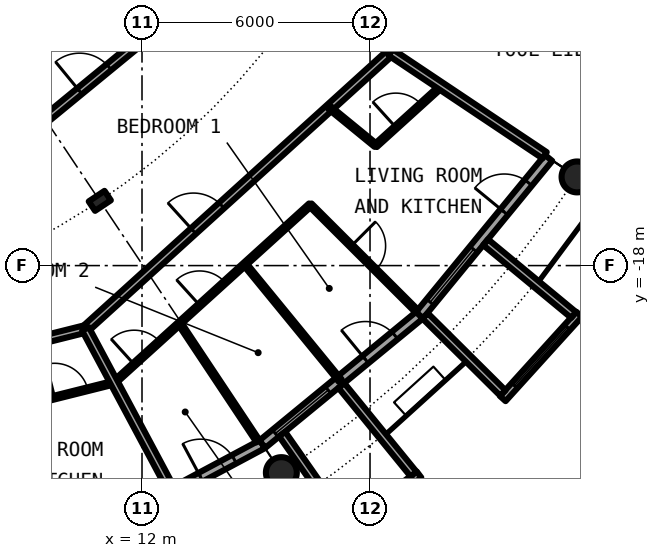
"""IFC4 building model, lengths in metres.
Left out: names, types, materials, properties, quantities, classifications, styles, units other than length and angle.
Written with IfcOpenShell. Run it as: python <this file> out.ifc"""

import sys

from ifc_helpers import new_model, si_unit, direction, frame, frame_2d, origin, origin_2d, place, context, subcontext, project, spatial, rectangle, circle, hollow_circle, i_section, extrude, element, fill, save


model = new_model("IFC4")
c1 = context("Model", 3, precision=1e-05, world=origin(), true_north=direction((0.0, 1.0)))
c2 = subcontext(c1, "Body", "Model", "MODEL_VIEW")
j1 = project(units=[si_unit("LENGTHUNIT", "METRE"), si_unit("PLANEANGLEUNIT", "RADIAN")], contexts=[c1])
p1 = place(None, origin())
s1 = spatial("IfcSite", under=j1, at=p1, CompositionType="ELEMENT")
p2 = place(p1, origin())
s2 = spatial("IfcBuilding", under=s1, at=p2, CompositionType="ELEMENT")
p3 = place(p2, frame((0.0, 0.0, 161.6)))
s3 = spatial("IfcBuildingStorey", under=s2, at=p3, CompositionType="ELEMENT", Elevation=161.6)
for number, where, z_axis, x_axis in (
    (1, (15.667, -23.448, 0.0), (0.0, 0.0, 1.0), (1.0, 0.0, 0.0)),
    (2, (23.448, -15.667, 0.0), (0.0, 0.0, 1.0), (1.0, 0.0, 0.0)),
):
    element("IfcColumn", number, at=place(p3, frame(where, z_axis=z_axis, x_axis=x_axis)), inside=s3, PredefinedType="COLUMN", context=c2, shape_type="SweptSolid", body=[
        extrude(hollow_circle(Radius=0.406, WallThickness=0.04, at=origin_2d()), origin(), (0.0, 0.0, 1.0), 3.05),
    ])
p4 = place(p3, frame((10.889, -16.297, 0.0), z_axis=(0.0, 0.0, 1.0), x_axis=(0.55557023302, -0.831469612303, 0.0)))
e3 = element("IfcColumn", 3, at=p4, inside=s3, PredefinedType="COLUMN", context=c2, shape_type="SweptSolid", body=[
    extrude(i_section(OverallWidth=0.3, OverallDepth=0.5, WebThickness=0.014, FlangeThickness=0.028, FilletRadius=0.027, at=origin_2d()), origin(), (0.0, 0.0, 1.0), 3.05),
])
p5 = place(p3, frame((10.447, -25.222, 0.0), z_axis=(0.0, 0.0, 1.0), x_axis=(0.881915646801, 0.471407246368, 0.0)))
e4 = element("IfcWall", 4, at=p5, inside=s3, PredefinedType="SOLIDWALL", context=c2, shape_type="SweptSolid", body=[
    extrude(rectangle(XDim=5.352, YDim=0.25, at=frame_2d((2.676, 0.0))), origin(), (0.0, 0.0, 1.0), 2.7),
])
p6 = place(p5, frame((0.441, 0.0, 0.3)))
e5 = element("IfcOpeningElement", 5, at=p6, cuts=e4, PredefinedType="OPENING", context=c2, shape_type="SweptSolid", body=[
    extrude(rectangle(XDim=1.8, YDim=2.1, at=frame_2d((0.9, 1.05))), frame((0.0, 0.135, 0.0), z_axis=(0.0, -1.0, 0.0), x_axis=(1.0, 0.0, 0.0)), (0.0, 0.0, 1.0), 0.27),
])
p7 = place(p5, frame((3.51, 0.0, 0.0)))
e6 = element("IfcOpeningElement", 6, at=p7, cuts=e4, PredefinedType="OPENING", context=c2, shape_type="SweptSolid", body=[
    extrude(rectangle(XDim=1.0, YDim=2.2, at=frame_2d((0.5, 1.1))), frame((0.0, 0.135, 0.0), z_axis=(0.0, -1.0, 0.0), x_axis=(1.0, 0.0, 0.0)), (0.0, 0.0, 1.0), 0.27),
])
p8 = place(p3, frame((15.167, -22.699, 0.0), z_axis=(0.0, 0.0, 1.0), x_axis=(0.773019449054, 0.634382322723, 0.0)))
e7 = element("IfcWall", 7, at=p8, inside=s3, PredefinedType="SOLIDWALL", context=c2, shape_type="SweptSolid", body=[
    extrude(rectangle(XDim=5.352, YDim=0.25, at=frame_2d((2.676, 0.0))), origin(), (0.0, 0.0, 1.0), 2.7),
])
p9 = place(p8, frame((0.441, 0.0, 0.3)))
e8 = element("IfcOpeningElement", 8, at=p9, cuts=e7, PredefinedType="OPENING", context=c2, shape_type="SweptSolid", body=[
    extrude(rectangle(XDim=1.8, YDim=2.1, at=frame_2d((0.9, 1.05))), frame((0.0, 0.135, 0.0), z_axis=(0.0, -1.0, 0.0), x_axis=(1.0, 0.0, 0.0)), (0.0, 0.0, 1.0), 0.27),
])
p10 = place(p8, frame((3.51, 0.0, 0.0)))
e9 = element("IfcOpeningElement", 9, at=p10, cuts=e7, PredefinedType="OPENING", context=c2, shape_type="SweptSolid", body=[
    extrude(rectangle(XDim=1.0, YDim=2.2, at=frame_2d((0.5, 1.1))), frame((0.0, 0.135, 0.0), z_axis=(0.0, -1.0, 0.0), x_axis=(1.0, 0.0, 0.0)), (0.0, 0.0, 1.0), 0.27),
])
p11 = place(p3, frame((17.337, -24.972, -0.03), z_axis=(0.0, 0.0, 1.0), x_axis=(0.797887588059, 0.602806268067, 0.0)))
e10 = element("IfcWall", 10, at=p11, inside=s3, PredefinedType="SOLIDWALL", context=c2, shape_type="SweptSolid", body=[
    extrude(rectangle(XDim=2.447, YDim=0.2, at=frame_2d((1.223, 0.0))), origin(), (0.0, 0.0, 1.0), 2.73),
])
p12 = place(p11, frame((0.183, 0.0, 0.33)))
e11 = element("IfcOpeningElement", 11, at=p12, cuts=e10, PredefinedType="OPENING", context=c2, shape_type="SweptSolid", body=[
    extrude(circle(Radius=1.04, at=frame_2d((1.04, 1.04))), frame((0.0, 0.11, 0.0), z_axis=(0.0, -1.0, 0.0), x_axis=(1.0, 0.0, 0.0)), (0.0, 0.0, 1.0), 0.22),
])
p13 = place(p3, frame((15.688, -22.433, -0.03), z_axis=(0.0, 0.0, 1.0), x_axis=(0.573260687834, -0.819373043115, 0.0)))
e12 = element("IfcWall", 12, at=p13, inside=s3, PredefinedType="SOLIDWALL", context=c2, shape_type="SweptSolid", body=[
    extrude(rectangle(XDim=2.925, YDim=0.2, at=frame_2d((1.463, 0.0))), origin(), (0.0, 0.0, 1.0), 2.73),
])
p14 = place(p3, frame((17.246, -21.155, -0.03), z_axis=(0.0, 0.0, 1.0), x_axis=(0.631741648902, -0.775179004516, 0.0)))
e13 = element("IfcWall", 13, at=p14, inside=s3, PredefinedType="SOLIDWALL", context=c2, shape_type="SweptSolid", body=[
    extrude(rectangle(XDim=3.006, YDim=0.2, at=frame_2d((1.503, 0.0))), origin(), (0.0, 0.0, 1.0), 2.73),
])
p15 = place(p3, frame((19.304, -19.304, 0.0), z_axis=(0.0, 0.0, 1.0), x_axis=(0.634382322723, 0.773019449054, 0.0)))
e14 = element("IfcWall", 14, at=p15, inside=s3, PredefinedType="SOLIDWALL", context=c2, shape_type="SweptSolid", body=[
    extrude(rectangle(XDim=5.352, YDim=0.25, at=frame_2d((2.676, 0.0))), origin(), (0.0, 0.0, 1.0), 2.7),
])
p16 = place(p15, frame((0.441, 0.0, 0.3)))
e15 = element("IfcOpeningElement", 15, at=p16, cuts=e14, PredefinedType="OPENING", context=c2, shape_type="SweptSolid", body=[
    extrude(rectangle(XDim=1.8, YDim=2.1, at=frame_2d((0.9, 1.05))), frame((0.0, 0.135, 0.0), z_axis=(0.0, -1.0, 0.0), x_axis=(1.0, 0.0, 0.0)), (0.0, 0.0, 1.0), 0.27),
])
p17 = place(p15, frame((3.51, 0.0, 0.0)))
e16 = element("IfcOpeningElement", 16, at=p17, cuts=e14, PredefinedType="OPENING", context=c2, shape_type="SweptSolid", body=[
    extrude(rectangle(XDim=1.0, YDim=2.2, at=frame_2d((0.5, 1.1))), frame((0.0, 0.135, 0.0), z_axis=(0.0, -1.0, 0.0), x_axis=(1.0, 0.0, 0.0)), (0.0, 0.0, 1.0), 0.27),
])
p18 = place(p3, frame((21.493, -21.5, -0.03), z_axis=(0.0, 0.0, 1.0), x_axis=(0.671506829416, 0.740998365753, 0.0)))
e17 = element("IfcWall", 17, at=p18, inside=s3, PredefinedType="SOLIDWALL", context=c2, shape_type="SweptSolid", body=[
    extrude(rectangle(XDim=2.993, YDim=0.2, at=frame_2d((1.497, 0.0))), origin(), (0.0, 0.0, 1.0), 2.73),
])
p19 = place(p18, frame((0.457, 0.0, 0.33)))
e18 = element("IfcOpeningElement", 18, at=p19, cuts=e17, PredefinedType="OPENING", context=c2, shape_type="SweptSolid", body=[
    extrude(circle(Radius=1.04, at=frame_2d((1.04, 1.04))), frame((0.0, 0.11, 0.0), z_axis=(0.0, -1.0, 0.0), x_axis=(1.0, 0.0, 0.0)), (0.0, 0.0, 1.0), 0.22),
])
p20 = place(p3, frame((19.45, -19.323, -0.03), z_axis=(0.0, 0.0, 1.0), x_axis=(0.709727076896, -0.704476739375, 0.0)))
e19 = element("IfcWall", 19, at=p20, inside=s3, PredefinedType="SOLIDWALL", context=c2, shape_type="SweptSolid", body=[
    extrude(rectangle(XDim=2.883, YDim=0.2, at=frame_2d((1.441, 0.0))), origin(), (0.0, 0.0, 1.0), 2.73),
])
p21 = place(p3, frame((21.041, -17.384, -0.03), z_axis=(0.0, 0.0, 1.0), x_axis=(0.770784861449, -0.63709551667, 0.0)))
e20 = element("IfcWall", 20, at=p21, inside=s3, PredefinedType="SOLIDWALL", context=c2, shape_type="SweptSolid", body=[
    extrude(rectangle(XDim=3.006, YDim=0.2, at=frame_2d((1.503, 0.0))), origin(), (0.0, 0.0, 1.0), 2.73),
])
p22 = place(p3, frame((9.012, -21.643, 0.0), z_axis=(0.0, 0.0, 1.0), x_axis=(0.970025067561, 0.243004873001, 0.0)))
e21 = element("IfcWall", 21, at=p22, inside=s3, PredefinedType="PARTITIONING", context=c2, shape_type="SweptSolid", body=[
    extrude(rectangle(XDim=2.326, YDim=0.1, at=frame_2d((1.163, 0.0))), origin(), (0.0, 0.0, 1.0), 2.7),
])
p23 = place(p22, frame((0.71, 0.0, 0.0)))
e22 = element("IfcOpeningElement", 22, at=p23, cuts=e21, PredefinedType="OPENING", context=c2, shape_type="SweptSolid", body=[
    extrude(rectangle(XDim=0.9, YDim=2.3, at=frame_2d((0.45, 1.15))), frame((0.0, 0.06, 0.0), z_axis=(0.0, -1.0, 0.0), x_axis=(1.0, 0.0, 0.0)), (0.0, 0.0, 1.0), 0.12),
])
p24 = place(p3, frame((11.266, -21.078, 0.0), z_axis=(0.0, 0.0, 1.0), x_axis=(0.74114118713, 0.671349194339, 0.0)))
e23 = element("IfcWall", 23, at=p24, inside=s3, PredefinedType="PARTITIONING", context=c2, shape_type="SweptSolid", body=[
    extrude(rectangle(XDim=6.965, YDim=0.1, at=frame_2d((3.482, 0.0))), origin(), (0.0, 0.0, 1.0), 2.7),
])
p25 = place(p24, frame((3.034, 0.0, 0.0)))
e24 = element("IfcOpeningElement", 24, at=p25, cuts=e23, PredefinedType="OPENING", context=c2, shape_type="SweptSolid", body=[
    extrude(rectangle(XDim=0.9, YDim=2.3, at=frame_2d((0.45, 1.15))), frame((0.0, 0.06, 0.0), z_axis=(0.0, -1.0, 0.0), x_axis=(1.0, 0.0, 0.0)), (0.0, 0.0, 1.0), 0.12),
])
p26 = place(p24, frame((0.712, 0.0, 0.0)))
e25 = element("IfcOpeningElement", 25, at=p26, cuts=e23, PredefinedType="OPENING", context=c2, shape_type="SweptSolid", body=[
    extrude(rectangle(XDim=0.9, YDim=2.3, at=frame_2d((0.45, 1.15))), frame((0.0, 0.06, 0.0), z_axis=(0.0, -1.0, 0.0), x_axis=(1.0, 0.0, 0.0)), (0.0, 0.0, 1.0), 0.12),
])
p27 = place(p3, frame((18.147, -14.844, 0.0), z_axis=(0.0, 0.0, 1.0), x_axis=(0.741080073381, 0.671416655169, 0.0)))
e26 = element("IfcWall", 26, at=p27, inside=s3, PredefinedType="PARTITIONING", context=c2, shape_type="SweptSolid", body=[
    extrude(rectangle(XDim=2.323, YDim=0.1, at=frame_2d((1.162, 0.0))), origin(), (0.0, 0.0, 1.0), 2.7),
])
p28 = place(p27, frame((0.718, 0.0, 0.0)))
e27 = element("IfcOpeningElement", 27, at=p28, cuts=e26, PredefinedType="OPENING", context=c2, shape_type="SweptSolid", body=[
    extrude(rectangle(XDim=0.9, YDim=2.3, at=frame_2d((0.45, 1.15))), frame((0.0, 0.06, 0.0), z_axis=(0.0, -1.0, 0.0), x_axis=(1.0, 0.0, 0.0)), (0.0, 0.0, 1.0), 0.12),
])
p29 = place(p3, frame((18.542, -12.389, 0.0), z_axis=(0.0, 0.0, 1.0), x_axis=(0.465605550524, 0.884992356646, 0.0)))
e28 = element("IfcWall", 28, at=p29, inside=s3, PredefinedType="PARTITIONING", context=c2, shape_type="SweptSolid", body=[
    extrude(rectangle(XDim=1.643, YDim=0.2, at=frame_2d((0.821, 0.0))), origin(), (0.0, 0.0, 1.0), 2.7),
])
p30 = place(p3, frame((0.0, -22.3, 0.0), z_axis=(0.0, 0.0, 1.0), x_axis=(0.970023181991, 0.243012399685, 0.0)))
e29 = element("IfcWall", 29, at=p30, inside=s3, PredefinedType="PARTITIONING", context=c2, shape_type="SweptSolid", body=[
    extrude(rectangle(XDim=10.843, YDim=0.2, at=frame_2d((5.421, 0.0))), origin(), (0.0, 0.0, 1.0), 2.7),
])
p31 = place(p30, frame((3.835, 0.0, 0.0)))
e30 = element("IfcOpeningElement", 30, at=p31, cuts=e29, PredefinedType="OPENING", context=c2, shape_type="SweptSolid", body=[
    extrude(rectangle(XDim=1.0, YDim=2.3, at=frame_2d((0.5, 1.15))), frame((0.0, 0.11, 0.0), z_axis=(0.0, -1.0, 0.0), x_axis=(1.0, 0.0, 0.0)), (0.0, 0.0, 1.0), 0.22),
])
p32 = place(p3, frame((10.512, -19.667, 0.0), z_axis=(0.0, 0.0, 1.0), x_axis=(0.740947367223, 0.671563101283, 0.0)))
e31 = element("IfcWall", 31, at=p32, inside=s3, PredefinedType="PARTITIONING", context=c2, shape_type="SweptSolid", body=[
    extrude(rectangle(XDim=10.837, YDim=0.2, at=frame_2d((5.419, 0.0))), origin(), (0.0, 0.0, 1.0), 2.7),
])
p33 = place(p32, frame((3.835, 0.0, 0.0)))
e32 = element("IfcOpeningElement", 32, at=p33, cuts=e31, PredefinedType="OPENING", context=c2, shape_type="SweptSolid", body=[
    extrude(rectangle(XDim=1.0, YDim=2.3, at=frame_2d((0.5, 1.15))), frame((0.0, 0.11, 0.0), z_axis=(0.0, -1.0, 0.0), x_axis=(1.0, 0.0, 0.0)), (0.0, 0.0, 1.0), 0.22),
])
p34 = place(p3, frame((6.773, -16.353, 0.0), z_axis=(0.0, 0.0, 1.0), x_axis=(0.773034536097, 0.634363938131, 0.0)))
e33 = element("IfcWall", 33, at=p34, inside=s3, PredefinedType="PARTITIONING", context=c2, shape_type="SweptSolid", body=[
    extrude(rectangle(XDim=10.277, YDim=0.2, at=frame_2d((5.138, 0.0))), origin(), (0.0, 0.0, 1.0), 2.7),
])
p35 = place(p34, frame((4.638, 0.0, 0.0)))
e34 = element("IfcOpeningElement", 34, at=p35, cuts=e33, PredefinedType="OPENING", context=c2, shape_type="SweptSolid", body=[
    extrude(rectangle(XDim=1.0, YDim=2.3, at=frame_2d((0.5, 1.15))), frame((0.0, 0.11, 0.0), z_axis=(0.0, -1.0, 0.0), x_axis=(1.0, 0.0, 0.0)), (0.0, 0.0, 1.0), 0.22),
])
p36 = place(p3, frame((10.512, -19.667, 0.0), z_axis=(0.0, 0.0, 1.0), x_axis=(0.471427642527, -0.881904744211, 0.0)))
e35 = element("IfcWall", 35, at=p36, inside=s3, PredefinedType="PARTITIONING", context=c2, shape_type="SweptSolid", body=[
    extrude(rectangle(XDim=4.875, YDim=0.2, at=frame_2d((2.438, 0.0))), origin(), (0.0, 0.0, 1.0), 2.7),
])
p37 = place(p3, frame((12.988, -19.518, 0.0), z_axis=(0.0, 0.0, 1.0), x_axis=(0.553823887887, -0.83263383381, 0.0)))
e36 = element("IfcWall", 36, at=p37, inside=s3, PredefinedType="PARTITIONING", context=c2, shape_type="SweptSolid", body=[
    extrude(rectangle(XDim=3.73, YDim=0.1, at=frame_2d((1.865, 0.0))), origin(), (0.0, 0.0, 1.0), 2.7),
])
p38 = place(p3, frame((14.706, -17.961, 0.0), z_axis=(0.0, 0.0, 1.0), x_axis=(0.633590098448, -0.773668913133, 0.0)))
e37 = element("IfcWall", 37, at=p38, inside=s3, PredefinedType="PARTITIONING", context=c2, shape_type="SweptSolid", body=[
    extrude(rectangle(XDim=3.962, YDim=0.1, at=frame_2d((1.981, 0.0))), origin(), (0.0, 0.0, 1.0), 2.7),
])
p39 = place(p3, frame((16.427, -16.401, 0.0), z_axis=(0.0, 0.0, 1.0), x_axis=(0.707722727509, -0.706490297858, 0.0)))
e38 = element("IfcWall", 38, at=p39, inside=s3, PredefinedType="PARTITIONING", context=c2, shape_type="SweptSolid", body=[
    extrude(rectangle(XDim=3.962, YDim=0.1, at=frame_2d((1.981, 0.0))), origin(), (0.0, 0.0, 1.0), 2.7),
])
p40 = place(p39, frame((1.531, 0.0, 0.0)))
e39 = element("IfcOpeningElement", 39, at=p40, cuts=e38, PredefinedType="OPENING", context=c2, shape_type="SweptSolid", body=[
    extrude(rectangle(XDim=0.9, YDim=2.3, at=frame_2d((0.45, 1.15))), frame((0.0, 0.06, 0.0), z_axis=(0.0, -1.0, 0.0), x_axis=(1.0, 0.0, 0.0)), (0.0, 0.0, 1.0), 0.12),
])
p41 = place(p3, frame((16.936, -13.845, 0.0), z_axis=(0.0, 0.0, 1.0), x_axis=(0.774283039722, -0.632839453889, 0.0)))
e40 = element("IfcWall", 40, at=p41, inside=s3, PredefinedType="PARTITIONING", context=c2, shape_type="SweptSolid", body=[
    extrude(rectangle(XDim=1.569, YDim=0.1, at=frame_2d((0.785, 0.0))), origin(), (0.0, 0.0, 1.0), 2.7),
])
p42 = place(p3, frame((18.542, -12.389, 0.0), z_axis=(0.0, 0.0, 1.0), x_axis=(0.831387096605, -0.55569370664, 0.0)))
e41 = element("IfcWall", 41, at=p42, inside=s3, PredefinedType="PARTITIONING", context=c2, shape_type="SweptSolid", body=[
    extrude(rectangle(XDim=4.875, YDim=0.2, at=frame_2d((2.438, 0.0))), origin(), (0.0, 0.0, 1.0), 2.7),
])
p43 = place(p7, origin())
e42 = element("IfcDoor", 42, at=p43, inside=s3, OperationType="SINGLE_SWING_LEFT", PredefinedType="DOOR", context=c2, shape_type="SweptSolid", body=[
    extrude(rectangle(XDim=1.0, YDim=2.2, at=frame_2d((0.5, 1.1))), frame((0.0, 0.025, 0.0), z_axis=(0.0, -1.0, 0.0), x_axis=(1.0, 0.0, 0.0)), (0.0, 0.0, 1.0), 0.05),
])
fill(e6, e42)
p44 = place(p9, origin())
e43 = element("IfcWindow", 43, at=p44, inside=s3, PartitioningType="SINGLE_PANEL", PredefinedType="WINDOW", context=c2, shape_type="SweptSolid", body=[
    extrude(rectangle(XDim=1.8, YDim=2.1, at=frame_2d((0.9, 1.05))), frame((0.0, 0.03, 0.0), z_axis=(0.0, -1.0, 0.0), x_axis=(1.0, 0.0, 0.0)), (0.0, 0.0, 1.0), 0.06),
])
fill(e8, e43)
p45 = place(p12, origin())
e44 = element("IfcWindow", 44, at=p45, inside=s3, PartitioningType="SINGLE_PANEL", PredefinedType="WINDOW", context=c2, shape_type="SweptSolid", body=[
    extrude(circle(Radius=1.04, at=frame_2d((1.04, 1.04))), frame((0.0, 0.03, 0.0), z_axis=(0.0, -1.0, 0.0), x_axis=(1.0, 0.0, 0.0)), (0.0, 0.0, 1.0), 0.06),
])
fill(e11, e44)
p46 = place(p10, origin())
e45 = element("IfcDoor", 45, at=p46, inside=s3, OperationType="SINGLE_SWING_LEFT", PredefinedType="DOOR", context=c2, shape_type="SweptSolid", body=[
    extrude(rectangle(XDim=1.0, YDim=2.2, at=frame_2d((0.5, 1.1))), frame((0.0, 0.025, 0.0), z_axis=(0.0, -1.0, 0.0), x_axis=(1.0, 0.0, 0.0)), (0.0, 0.0, 1.0), 0.05),
])
fill(e9, e45)
p47 = place(p16, origin())
e46 = element("IfcWindow", 46, at=p47, inside=s3, PartitioningType="SINGLE_PANEL", PredefinedType="WINDOW", context=c2, shape_type="SweptSolid", body=[
    extrude(rectangle(XDim=1.8, YDim=2.1, at=frame_2d((0.9, 1.05))), frame((0.0, 0.03, 0.0), z_axis=(0.0, -1.0, 0.0), x_axis=(1.0, 0.0, 0.0)), (0.0, 0.0, 1.0), 0.06),
])
fill(e15, e46)
p48 = place(p19, origin())
e47 = element("IfcWindow", 47, at=p48, inside=s3, PartitioningType="SINGLE_PANEL", PredefinedType="WINDOW", context=c2, shape_type="SweptSolid", body=[
    extrude(circle(Radius=1.04, at=frame_2d((1.04, 1.04))), frame((0.0, 0.03, 0.0), z_axis=(0.0, -1.0, 0.0), x_axis=(1.0, 0.0, 0.0)), (0.0, 0.0, 1.0), 0.06),
])
fill(e18, e47)
p49 = place(p17, origin())
e48 = element("IfcDoor", 48, at=p49, inside=s3, OperationType="SINGLE_SWING_LEFT", PredefinedType="DOOR", context=c2, shape_type="SweptSolid", body=[
    extrude(rectangle(XDim=1.0, YDim=2.2, at=frame_2d((0.5, 1.1))), frame((0.0, 0.025, 0.0), z_axis=(0.0, -1.0, 0.0), x_axis=(1.0, 0.0, 0.0)), (0.0, 0.0, 1.0), 0.05),
])
fill(e16, e48)
p50 = place(p23, origin())
e49 = element("IfcDoor", 49, at=p50, inside=s3, OperationType="SINGLE_SWING_LEFT", PredefinedType="DOOR", context=c2, shape_type="SweptSolid", body=[
    extrude(rectangle(XDim=0.9, YDim=2.3, at=frame_2d((0.45, 1.15))), frame((0.0, 0.025, 0.0), z_axis=(0.0, -1.0, 0.0), x_axis=(1.0, 0.0, 0.0)), (0.0, 0.0, 1.0), 0.05),
])
fill(e22, e49)
p51 = place(p33, origin())
e50 = element("IfcDoor", 50, at=p51, inside=s3, OperationType="SINGLE_SWING_LEFT", PredefinedType="DOOR", context=c2, shape_type="SweptSolid", body=[
    extrude(rectangle(XDim=1.0, YDim=2.3, at=frame_2d((0.5, 1.15))), frame((0.0, 0.025, 0.0), z_axis=(0.0, -1.0, 0.0), x_axis=(1.0, 0.0, 0.0)), (0.0, 0.0, 1.0), 0.05),
])
fill(e32, e50)
p52 = place(p28, origin())
e51 = element("IfcDoor", 51, at=p52, inside=s3, OperationType="SINGLE_SWING_RIGHT", PredefinedType="DOOR", context=c2, shape_type="SweptSolid", body=[
    extrude(rectangle(XDim=0.9, YDim=2.3, at=frame_2d((0.45, 1.15))), frame((0.0, 0.025, 0.0), z_axis=(0.0, -1.0, 0.0), x_axis=(1.0, 0.0, 0.0)), (0.0, 0.0, 1.0), 0.05),
])
fill(e27, e51)
p53 = place(p40, origin())
e52 = element("IfcDoor", 52, at=p53, inside=s3, OperationType="SINGLE_SWING_RIGHT", PredefinedType="DOOR", context=c2, shape_type="SweptSolid", body=[
    extrude(rectangle(XDim=0.9, YDim=2.3, at=frame_2d((0.45, 1.15))), frame((0.0, 0.025, 0.0), z_axis=(0.0, -1.0, 0.0), x_axis=(1.0, 0.0, 0.0)), (0.0, 0.0, 1.0), 0.05),
])
fill(e39, e52)
p54 = place(p25, origin())
e53 = element("IfcDoor", 53, at=p54, inside=s3, OperationType="SINGLE_SWING_RIGHT", PredefinedType="DOOR", context=c2, shape_type="SweptSolid", body=[
    extrude(rectangle(XDim=0.9, YDim=2.3, at=frame_2d((0.45, 1.15))), frame((0.0, 0.025, 0.0), z_axis=(0.0, -1.0, 0.0), x_axis=(1.0, 0.0, 0.0)), (0.0, 0.0, 1.0), 0.05),
])
fill(e24, e53)
p55 = place(p26, origin())
e54 = element("IfcDoor", 54, at=p55, inside=s3, OperationType="SINGLE_SWING_LEFT", PredefinedType="DOOR", context=c2, shape_type="SweptSolid", body=[
    extrude(rectangle(XDim=0.9, YDim=2.3, at=frame_2d((0.45, 1.15))), frame((0.0, 0.025, 0.0), z_axis=(0.0, -1.0, 0.0), x_axis=(1.0, 0.0, 0.0)), (0.0, 0.0, 1.0), 0.05),
])
fill(e25, e54)
p56 = place(p35, origin())
e55 = element("IfcDoor", 55, at=p56, inside=s3, OperationType="SINGLE_SWING_RIGHT", PredefinedType="DOOR", context=c2, shape_type="SweptSolid", body=[
    extrude(rectangle(XDim=1.0, YDim=2.3, at=frame_2d((0.5, 1.15))), frame((0.0, 0.025, 0.0), z_axis=(0.0, -1.0, 0.0), x_axis=(1.0, 0.0, 0.0)), (0.0, 0.0, 1.0), 0.05),
])
fill(e34, e55)
save(model, sys.argv[1])
